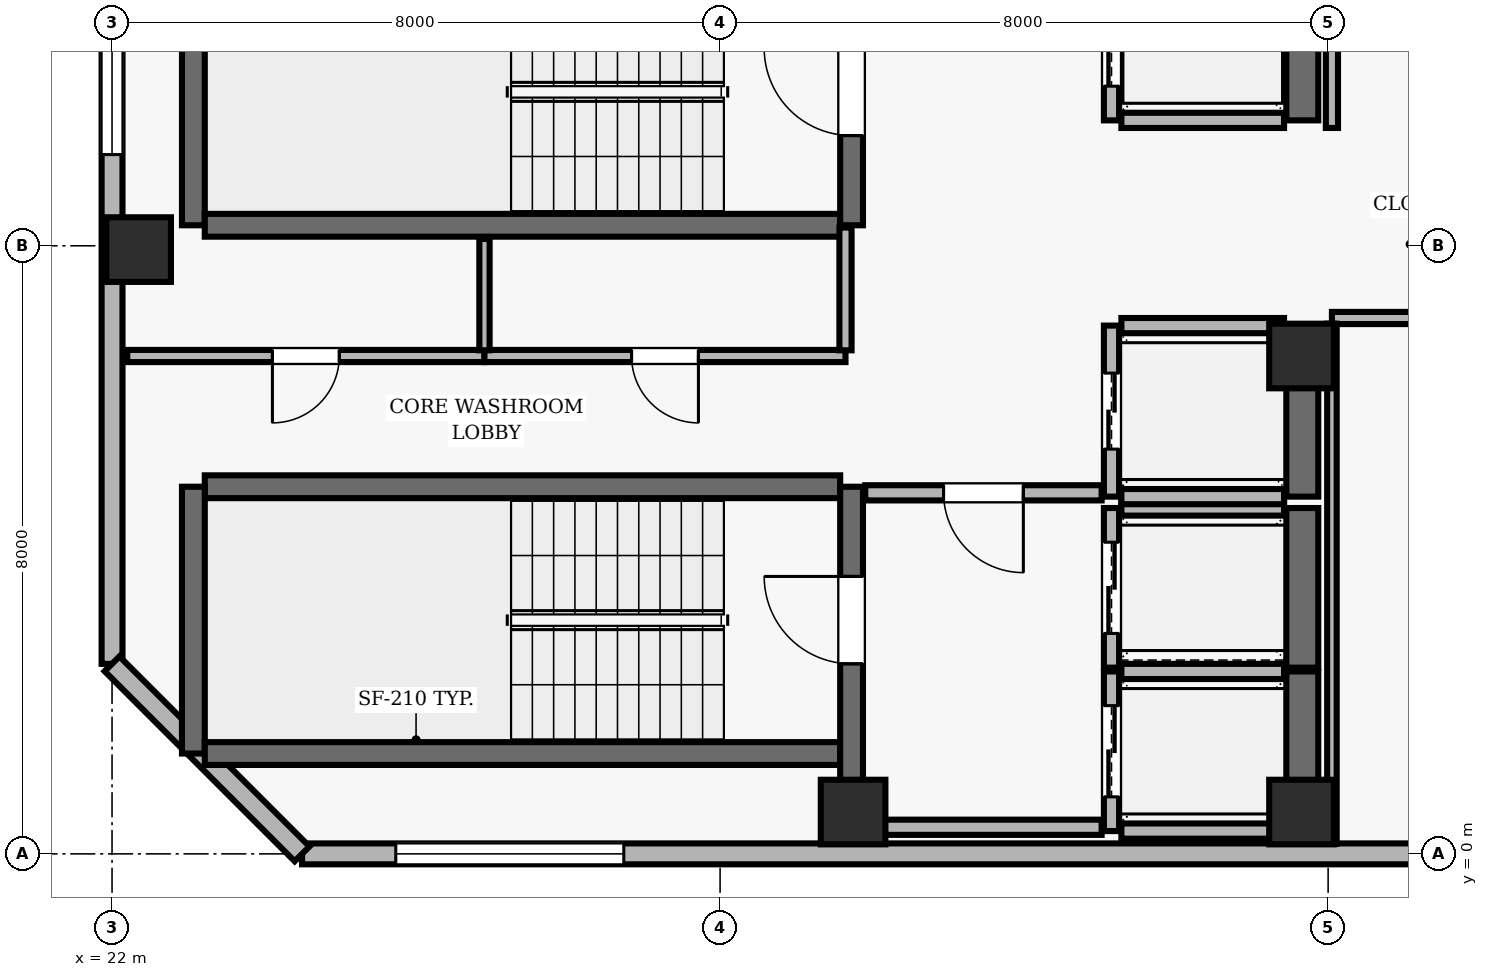
"""IFC4 building model, lengths in metres.
Left out: names, types, materials, properties, quantities, classifications, styles, units other than length and angle.
Written with IfcOpenShell. Run it as: python <this file> out.ifc"""

import sys

from ifc_helpers import new_model, si_unit, direction, frame, frame_2d, origin, origin_2d, place, context, subcontext, project, spatial, rectangle, extrude, element, fill, save


model = new_model("IFC4")
c1 = context("Model", 3, precision=1e-05, world=origin(), true_north=direction((0.0, 1.0)))
c2 = subcontext(c1, "Body", "Model", "MODEL_VIEW")
j1 = project(units=[si_unit("LENGTHUNIT", "METRE"), si_unit("PLANEANGLEUNIT", "RADIAN")], contexts=[c1])
p1 = place(None, origin())
s1 = spatial("IfcSite", under=j1, at=p1, CompositionType="ELEMENT")
p2 = place(p1, origin())
s2 = spatial("IfcBuilding", under=s1, at=p2, CompositionType="ELEMENT")
p3 = place(p2, frame((0.0, 0.0, 291.1)))
s3 = spatial("IfcBuildingStorey", under=s2, at=p3, CompositionType="ELEMENT", Elevation=291.1)
for number, where, z_axis, x_axis in (
    (1, (31.75, 0.55, 0.0), (0.0, 0.0, 1.0), (1.0, 0.0, 0.0)),
    (2, (37.65, 0.55, 0.0), (0.0, 0.0, 1.0), (1.0, 0.0, 0.0)),
    (3, (22.35, 7.95, 0.0), (0.0, 0.0, 1.0), (1.0, 0.0, 0.0)),
    (4, (37.65, 6.55, 0.0), (0.0, 0.0, 1.0), (1.0, 0.0, 0.0)),
):
    element("IfcColumn", number, at=place(p3, frame(where, z_axis=z_axis, x_axis=x_axis)), inside=s3, PredefinedType="COLUMN", context=c2, shape_type="SweptSolid", body=[
        extrude(rectangle(XDim=0.85, YDim=0.85, at=origin_2d()), origin(), (0.0, 0.0, 1.0), 3.9),
    ])
p4 = place(p3, frame((24.5, 0.0, 0.0), z_axis=(0.0, 0.0, 1.0), x_axis=(1.0, 0.0, 0.0)))
e5 = element("IfcWall", 5, at=p4, inside=s3, PredefinedType="SOLIDWALL", context=c2, shape_type="SweptSolid", body=[
    extrude(rectangle(XDim=32.8, YDim=0.275, at=frame_2d((16.4, 0.0))), origin(), (0.0, 0.0, 1.0), 3.69),
])
p5 = place(p4, frame((1.233, 0.0, 0.9)))
e6 = element("IfcOpeningElement", 6, at=p5, cuts=e5, PredefinedType="OPENING", context=c2, shape_type="SweptSolid", body=[
    extrude(rectangle(XDim=3.0, YDim=2.2, at=frame_2d((1.5, 1.1))), frame((0.0, 0.147, 0.0), z_axis=(0.0, -1.0, 0.0), x_axis=(1.0, 0.0, 0.0)), (0.0, 0.0, 1.0), 0.295),
])
p6 = place(p3, frame((22.0, 35.3, 0.0), z_axis=(0.0, 0.0, 1.0), x_axis=(0.0, -1.0, 0.0)))
e7 = element("IfcWall", 7, at=p6, inside=s3, PredefinedType="SOLIDWALL", context=c2, shape_type="SweptSolid", body=[
    extrude(rectangle(XDim=32.8, YDim=0.275, at=frame_2d((16.4, 0.0))), origin(), (0.0, 0.0, 1.0), 3.69),
])
p7 = place(p6, frame((7.3, 0.0, 0.0)))
e8 = element("IfcOpeningElement", 8, at=p7, cuts=e7, PredefinedType="OPENING", context=c2, shape_type="SweptSolid", body=[
    extrude(rectangle(XDim=1.0, YDim=2.2, at=frame_2d((0.5, 1.1))), frame((0.0, 0.147, 0.0), z_axis=(0.0, -1.0, 0.0), x_axis=(1.0, 0.0, 0.0)), (0.0, 0.0, 1.0), 0.295),
])
p8 = place(p6, frame((1.233, 0.0, 0.9)))
e9 = element("IfcOpeningElement", 9, at=p8, cuts=e7, PredefinedType="OPENING", context=c2, shape_type="SweptSolid", body=[
    extrude(rectangle(XDim=3.0, YDim=2.2, at=frame_2d((1.5, 1.1))), frame((0.0, 0.147, 0.0), z_axis=(0.0, -1.0, 0.0), x_axis=(1.0, 0.0, 0.0)), (0.0, 0.0, 1.0), 0.295),
])
p9 = place(p6, frame((12.617, 0.0, 0.9)))
e10 = element("IfcOpeningElement", 10, at=p9, cuts=e7, PredefinedType="OPENING", context=c2, shape_type="SweptSolid", body=[
    extrude(rectangle(XDim=3.0, YDim=2.2, at=frame_2d((1.5, 1.1))), frame((0.0, 0.147, 0.0), z_axis=(0.0, -1.0, 0.0), x_axis=(1.0, 0.0, 0.0)), (0.0, 0.0, 1.0), 0.295),
])
p10 = place(p6, frame((23.1, 0.0, 0.9)))
e11 = element("IfcOpeningElement", 11, at=p10, cuts=e7, PredefinedType="OPENING", context=c2, shape_type="SweptSolid", body=[
    extrude(rectangle(XDim=3.0, YDim=2.2, at=frame_2d((1.5, 1.1))), frame((0.0, 0.147, 0.0), z_axis=(0.0, -1.0, 0.0), x_axis=(1.0, 0.0, 0.0)), (0.0, 0.0, 1.0), 0.295),
])
p11 = place(p3, frame((22.0, 2.5, 0.0), z_axis=(0.0, 0.0, 1.0), x_axis=(0.707106781187, -0.707106781187, 0.0)))
e12 = element("IfcWall", 12, at=p11, inside=s3, PredefinedType="SOLIDWALL", context=c2, shape_type="SweptSolid", body=[
    extrude(rectangle(XDim=3.536, YDim=0.275, at=frame_2d((1.768, 0.0))), origin(), (0.0, 0.0, 1.0), 3.69),
])
p12 = place(p3, frame((31.58, 4.83, 0.0), z_axis=(0.0, 0.0, 1.0), x_axis=(-1.0, 0.0, 0.0)))
e13 = element("IfcWall", 13, at=p12, inside=s3, PredefinedType="SHEAR", context=c2, shape_type="SweptSolid", body=[
    extrude(rectangle(XDim=8.36, YDim=0.3, at=frame_2d((4.18, 0.0))), origin(), (0.0, 0.0, 1.0), 3.69),
])
p13 = place(p3, frame((23.07, 4.83, 0.0), z_axis=(0.0, 0.0, 1.0), x_axis=(0.0, -1.0, 0.0)))
e14 = element("IfcWall", 14, at=p13, inside=s3, PredefinedType="SHEAR", context=c2, shape_type="SweptSolid", body=[
    extrude(rectangle(XDim=3.51, YDim=0.3, at=frame_2d((1.755, 0.0))), origin(), (0.0, 0.0, 1.0), 3.69),
])
p14 = place(p3, frame((23.22, 1.32, 0.0), z_axis=(0.0, 0.0, 1.0), x_axis=(1.0, 0.0, 0.0)))
e15 = element("IfcWall", 15, at=p14, inside=s3, PredefinedType="SHEAR", context=c2, shape_type="SweptSolid", body=[
    extrude(rectangle(XDim=8.36, YDim=0.3, at=frame_2d((4.18, 0.0))), origin(), (0.0, 0.0, 1.0), 3.69),
])
p15 = place(p3, frame((31.73, 0.96, 0.0), z_axis=(0.0, 0.0, 1.0), x_axis=(0.0, 1.0, 0.0)))
e16 = element("IfcWall", 16, at=p15, inside=s3, PredefinedType="SHEAR", context=c2, shape_type="SweptSolid", body=[
    extrude(rectangle(XDim=3.87, YDim=0.3, at=frame_2d((1.935, 0.0))), origin(), (0.0, 0.0, 1.0), 3.69),
])
p16 = place(p15, frame((1.54, 0.0, 0.0)))
e17 = element("IfcOpeningElement", 17, at=p16, cuts=e16, PredefinedType="OPENING", context=c2, shape_type="SweptSolid", body=[
    extrude(rectangle(XDim=1.15, YDim=2.15, at=frame_2d((0.575, 1.075))), frame((0.0, 0.16, 0.0), z_axis=(0.0, -1.0, 0.0), x_axis=(1.0, 0.0, 0.0)), (0.0, 0.0, 1.0), 0.32),
])
p17 = place(p3, frame((23.07, 11.78, 0.0), z_axis=(0.0, 0.0, 1.0), x_axis=(0.0, -1.0, 0.0)))
e18 = element("IfcWall", 18, at=p17, inside=s3, PredefinedType="SHEAR", context=c2, shape_type="SweptSolid", body=[
    extrude(rectangle(XDim=3.51, YDim=0.3, at=frame_2d((1.755, 0.0))), origin(), (0.0, 0.0, 1.0), 3.69),
])
p18 = place(p3, frame((23.22, 8.27, 0.0), z_axis=(0.0, 0.0, 1.0), x_axis=(1.0, 0.0, 0.0)))
e19 = element("IfcWall", 19, at=p18, inside=s3, PredefinedType="SHEAR", context=c2, shape_type="SweptSolid", body=[
    extrude(rectangle(XDim=8.36, YDim=0.3, at=frame_2d((4.18, 0.0))), origin(), (0.0, 0.0, 1.0), 3.69),
])
p19 = place(p3, frame((31.73, 8.27, 0.0), z_axis=(0.0, 0.0, 1.0), x_axis=(0.0, 1.0, 0.0)))
e20 = element("IfcWall", 20, at=p19, inside=s3, PredefinedType="SHEAR", context=c2, shape_type="SweptSolid", body=[
    extrude(rectangle(XDim=3.51, YDim=0.3, at=frame_2d((1.755, 0.0))), origin(), (0.0, 0.0, 1.0), 3.69),
])
p20 = place(p19, frame((1.18, 0.0, 0.0)))
e21 = element("IfcOpeningElement", 21, at=p20, cuts=e20, PredefinedType="OPENING", context=c2, shape_type="SweptSolid", body=[
    extrude(rectangle(XDim=1.15, YDim=2.15, at=frame_2d((0.575, 1.075))), frame((0.0, 0.16, 0.0), z_axis=(0.0, -1.0, 0.0), x_axis=(1.0, 0.0, 0.0)), (0.0, 0.0, 1.0), 0.32),
])
p21 = place(p3, frame((35.15, 2.4, 0.0), z_axis=(0.0, 0.0, 1.0), x_axis=(0.0, -1.0, 0.0)))
e22 = element("IfcWall", 22, at=p21, inside=s3, PredefinedType="SOLIDWALL", context=c2, shape_type="SweptSolid", body=[
    extrude(rectangle(XDim=2.1, YDim=0.2, at=frame_2d((1.05, 0.0))), origin(), (0.0, 0.0, 1.0), 3.69),
])
p22 = place(p21, frame((0.45, 0.0, 0.0)))
e23 = element("IfcOpeningElement", 23, at=p22, cuts=e22, PredefinedType="OPENING", context=c2, shape_type="SweptSolid", body=[
    extrude(rectangle(XDim=1.2, YDim=2.15, at=frame_2d((0.6, 1.075))), frame((0.0, 0.11, 0.0), z_axis=(0.0, -1.0, 0.0), x_axis=(1.0, 0.0, 0.0)), (0.0, 0.0, 1.0), 0.22),
])
p23 = place(p3, frame((37.66, 0.3, 0.0), z_axis=(0.0, 0.0, 1.0), x_axis=(0.0, 1.0, 0.0)))
e24 = element("IfcWall", 24, at=p23, inside=s3, PredefinedType="SHEAR", context=c2, shape_type="SweptSolid", body=[
    extrude(rectangle(XDim=2.1, YDim=0.42, at=frame_2d((1.05, 0.0))), origin(), (0.0, 0.0, 1.0), 3.69),
])
for number, where, z_axis, x_axis in (
    (25, (35.28, 0.3, 0.0), (0.0, 0.0, 1.0), (1.0, 0.0, 0.0)),
    (26, (37.42, 2.4, 0.0), (0.0, 0.0, 1.0), (-1.0, 0.0, 0.0)),
):
    element("IfcWall", number, at=place(p3, frame(where, z_axis=z_axis, x_axis=x_axis)), inside=s3, PredefinedType="SOLIDWALL", context=c2, shape_type="SweptSolid", body=[
        extrude(rectangle(XDim=2.14, YDim=0.2, at=frame_2d((1.07, 0.0))), origin(), (0.0, 0.0, 1.0), 3.69),
    ])
p24 = place(p3, frame((35.15, 4.55, 0.0), z_axis=(0.0, 0.0, 1.0), x_axis=(0.0, -1.0, 0.0)))
e27 = element("IfcWall", 27, at=p24, inside=s3, PredefinedType="SOLIDWALL", context=c2, shape_type="SweptSolid", body=[
    extrude(rectangle(XDim=2.1, YDim=0.2, at=frame_2d((1.05, 0.0))), origin(), (0.0, 0.0, 1.0), 3.69),
])
p25 = place(p24, frame((0.45, 0.0, 0.0)))
e28 = element("IfcOpeningElement", 28, at=p25, cuts=e27, PredefinedType="OPENING", context=c2, shape_type="SweptSolid", body=[
    extrude(rectangle(XDim=1.2, YDim=2.15, at=frame_2d((0.6, 1.075))), frame((0.0, 0.11, 0.0), z_axis=(0.0, -1.0, 0.0), x_axis=(1.0, 0.0, 0.0)), (0.0, 0.0, 1.0), 0.22),
])
p26 = place(p3, frame((37.66, 2.45, 0.0), z_axis=(0.0, 0.0, 1.0), x_axis=(0.0, 1.0, 0.0)))
e29 = element("IfcWall", 29, at=p26, inside=s3, PredefinedType="SHEAR", context=c2, shape_type="SweptSolid", body=[
    extrude(rectangle(XDim=2.1, YDim=0.42, at=frame_2d((1.05, 0.0))), origin(), (0.0, 0.0, 1.0), 3.69),
])
p27 = place(p3, frame((37.42, 4.55, 0.0), z_axis=(0.0, 0.0, 1.0), x_axis=(-1.0, 0.0, 0.0)))
e30 = element("IfcWall", 30, at=p27, inside=s3, PredefinedType="SOLIDWALL", context=c2, shape_type="SweptSolid", body=[
    extrude(rectangle(XDim=2.14, YDim=0.2, at=frame_2d((1.07, 0.0))), origin(), (0.0, 0.0, 1.0), 3.69),
])
p28 = place(p3, frame((35.15, 6.95, 0.0), z_axis=(0.0, 0.0, 1.0), x_axis=(0.0, -1.0, 0.0)))
e31 = element("IfcWall", 31, at=p28, inside=s3, PredefinedType="SOLIDWALL", context=c2, shape_type="SweptSolid", body=[
    extrude(rectangle(XDim=2.25, YDim=0.2, at=frame_2d((1.125, 0.0))), origin(), (0.0, 0.0, 1.0), 3.69),
])
p29 = place(p28, frame((0.625, 0.0, 0.0)))
e32 = element("IfcOpeningElement", 32, at=p29, cuts=e31, PredefinedType="OPENING", context=c2, shape_type="SweptSolid", body=[
    extrude(rectangle(XDim=1.0, YDim=2.1, at=frame_2d((0.5, 1.05))), frame((0.0, 0.11, 0.0), z_axis=(0.0, -1.0, 0.0), x_axis=(1.0, 0.0, 0.0)), (0.0, 0.0, 1.0), 0.22),
])
p30 = place(p3, frame((37.66, 4.7, 0.0), z_axis=(0.0, 0.0, 1.0), x_axis=(0.0, 1.0, 0.0)))
e33 = element("IfcWall", 33, at=p30, inside=s3, PredefinedType="SHEAR", context=c2, shape_type="SweptSolid", body=[
    extrude(rectangle(XDim=2.25, YDim=0.42, at=frame_2d((1.125, 0.0))), origin(), (0.0, 0.0, 1.0), 3.69),
])
for number, where, z_axis, x_axis in (
    (34, (35.28, 4.7, 0.0), (0.0, 0.0, 1.0), (1.0, 0.0, 0.0)),
    (35, (37.42, 6.95, 0.0), (0.0, 0.0, 1.0), (-1.0, 0.0, 0.0)),
):
    element("IfcWall", number, at=place(p3, frame(where, z_axis=z_axis, x_axis=x_axis)), inside=s3, PredefinedType="SOLIDWALL", context=c2, shape_type="SweptSolid", body=[
        extrude(rectangle(XDim=2.14, YDim=0.2, at=frame_2d((1.07, 0.0))), origin(), (0.0, 0.0, 1.0), 3.69),
    ])
p31 = place(p3, frame((35.15, 11.55, 0.0), z_axis=(0.0, 0.0, 1.0), x_axis=(0.0, -1.0, 0.0)))
e36 = element("IfcWall", 36, at=p31, inside=s3, PredefinedType="SOLIDWALL", context=c2, shape_type="SweptSolid", body=[
    extrude(rectangle(XDim=1.9, YDim=0.2, at=frame_2d((0.95, 0.0))), origin(), (0.0, 0.0, 1.0), 3.69),
])
p32 = place(p31, frame((0.45, 0.0, 0.0)))
e37 = element("IfcOpeningElement", 37, at=p32, cuts=e36, PredefinedType="OPENING", context=c2, shape_type="SweptSolid", body=[
    extrude(rectangle(XDim=1.0, YDim=2.1, at=frame_2d((0.5, 1.05))), frame((0.0, 0.11, 0.0), z_axis=(0.0, -1.0, 0.0), x_axis=(1.0, 0.0, 0.0)), (0.0, 0.0, 1.0), 0.22),
])
p33 = place(p3, frame((37.66, 9.65, 0.0), z_axis=(0.0, 0.0, 1.0), x_axis=(0.0, 1.0, 0.0)))
e38 = element("IfcWall", 38, at=p33, inside=s3, PredefinedType="SHEAR", context=c2, shape_type="SweptSolid", body=[
    extrude(rectangle(XDim=1.9, YDim=0.42, at=frame_2d((0.95, 0.0))), origin(), (0.0, 0.0, 1.0), 3.69),
])
p34 = place(p3, frame((35.28, 9.65, 0.0), z_axis=(0.0, 0.0, 1.0), x_axis=(1.0, 0.0, 0.0)))
e39 = element("IfcWall", 39, at=p34, inside=s3, PredefinedType="SOLIDWALL", context=c2, shape_type="SweptSolid", body=[
    extrude(rectangle(XDim=2.14, YDim=0.2, at=frame_2d((1.07, 0.0))), origin(), (0.0, 0.0, 1.0), 3.69),
])
p35 = place(p3, frame((26.9, 6.55, 0.0), z_axis=(0.0, 0.0, 1.0), x_axis=(-1.0, 0.0, 0.0)))
e40 = element("IfcWall", 40, at=p35, inside=s3, PredefinedType="PARTITIONING", context=c2, shape_type="SweptSolid", body=[
    extrude(rectangle(XDim=4.7, YDim=0.16, at=frame_2d((2.35, 0.0))), origin(), (0.0, 0.0, 1.0), 3.69),
])
p36 = place(p35, frame((1.91, 0.0, 0.0)))
e41 = element("IfcOpeningElement", 41, at=p36, cuts=e40, PredefinedType="OPENING", context=c2, shape_type="SweptSolid", body=[
    extrude(rectangle(XDim=0.88, YDim=2.1, at=frame_2d((0.44, 1.05))), frame((0.0, 0.09, 0.0), z_axis=(0.0, -1.0, 0.0), x_axis=(1.0, 0.0, 0.0)), (0.0, 0.0, 1.0), 0.18),
])
p37 = place(p3, frame((31.65, 0.35, 0.0), z_axis=(0.0, 0.0, 1.0), x_axis=(1.0, 0.0, 0.0)))
e42 = element("IfcWall", 42, at=p37, inside=s3, PredefinedType="SOLIDWALL", context=c2, shape_type="SweptSolid", body=[
    extrude(rectangle(XDim=3.37, YDim=0.2, at=frame_2d((1.685, 0.0))), origin(), (0.0, 0.0, 1.0), 3.69),
])
p38 = place(p3, frame((31.65, 6.55, 0.0), z_axis=(0.0, 0.0, 1.0), x_axis=(-1.0, 0.0, 0.0)))
e43 = element("IfcWall", 43, at=p38, inside=s3, PredefinedType="PARTITIONING", context=c2, shape_type="SweptSolid", body=[
    extrude(rectangle(XDim=4.75, YDim=0.16, at=frame_2d((2.375, 0.0))), origin(), (0.0, 0.0, 1.0), 3.69),
])
p39 = place(p38, frame((1.935, 0.0, 0.0)))
e44 = element("IfcOpeningElement", 44, at=p39, cuts=e43, PredefinedType="OPENING", context=c2, shape_type="SweptSolid", body=[
    extrude(rectangle(XDim=0.88, YDim=2.1, at=frame_2d((0.44, 1.05))), frame((0.0, 0.09, 0.0), z_axis=(0.0, -1.0, 0.0), x_axis=(1.0, 0.0, 0.0)), (0.0, 0.0, 1.0), 0.18),
])
p40 = place(p3, frame((35.02, 4.75, 0.0), z_axis=(0.0, 0.0, 1.0), x_axis=(-1.0, 0.0, 0.0)))
e45 = element("IfcWall", 45, at=p40, inside=s3, PredefinedType="SOLIDWALL", context=c2, shape_type="SweptSolid", body=[
    extrude(rectangle(XDim=3.11, YDim=0.2, at=frame_2d((1.555, 0.0))), origin(), (0.0, 0.0, 1.0), 3.69),
])
p41 = place(p40, frame((1.03, 0.0, 0.0)))
e46 = element("IfcOpeningElement", 46, at=p41, cuts=e45, PredefinedType="OPENING", context=c2, shape_type="SweptSolid", body=[
    extrude(rectangle(XDim=1.05, YDim=2.15, at=frame_2d((0.525, 1.075))), frame((0.0, 0.11, 0.0), z_axis=(0.0, -1.0, 0.0), x_axis=(1.0, 0.0, 0.0)), (0.0, 0.0, 1.0), 0.22),
])
p42 = place(p3, frame((38.05, 7.05, 0.0), z_axis=(0.0, 0.0, 1.0), x_axis=(1.0, 0.0, 0.0)))
e47 = element("IfcWall", 47, at=p42, inside=s3, PredefinedType="PARTITIONING", context=c2, shape_type="SweptSolid", body=[
    extrude(rectangle(XDim=5.35, YDim=0.16, at=frame_2d((2.675, 0.0))), origin(), (0.0, 0.0, 1.0), 3.69),
])
p43 = place(p42, frame((2.225, 0.0, 0.0)))
e48 = element("IfcOpeningElement", 48, at=p43, cuts=e47, PredefinedType="OPENING", context=c2, shape_type="SweptSolid", body=[
    extrude(rectangle(XDim=0.9, YDim=2.1, at=frame_2d((0.45, 1.05))), frame((0.0, 0.09, 0.0), z_axis=(0.0, -1.0, 0.0), x_axis=(1.0, 0.0, 0.0)), (0.0, 0.0, 1.0), 0.18),
])
p44 = place(p3, frame((26.9, 6.625, 0.0), z_axis=(0.0, 0.0, 1.0), x_axis=(0.0, 1.0, 0.0)))
e49 = element("IfcWall", 49, at=p44, inside=s3, PredefinedType="PARTITIONING", context=c2, shape_type="SweptSolid", body=[
    extrude(rectangle(XDim=1.465, YDim=0.135, at=frame_2d((0.732, 0.0))), origin(), (0.0, 0.0, 1.0), 3.69),
])
p45 = place(p3, frame((31.65, 8.24, 0.0), z_axis=(0.0, 0.0, 1.0), x_axis=(0.0, -1.0, 0.0)))
e50 = element("IfcWall", 50, at=p45, inside=s3, PredefinedType="PARTITIONING", context=c2, shape_type="SweptSolid", body=[
    extrude(rectangle(XDim=1.615, YDim=0.16, at=frame_2d((0.808, 0.0))), origin(), (0.0, 0.0, 1.0), 3.69),
])
p46 = place(p3, frame((38.05, 6.975, 0.0), z_axis=(0.0, 0.0, 1.0), x_axis=(0.0, -1.0, 0.0)))
e51 = element("IfcWall", 51, at=p46, inside=s3, PredefinedType="PARTITIONING", context=c2, shape_type="SweptSolid", body=[
    extrude(rectangle(XDim=6.842, YDim=0.125, at=frame_2d((3.421, 0.0))), origin(), (0.0, 0.0, 1.0), 3.227),
])
p47 = place(p3, frame((38.05, 15.925, 0.0), z_axis=(0.0, 0.0, 1.0), x_axis=(0.0, -1.0, 0.0)))
e52 = element("IfcWall", 52, at=p47, inside=s3, PredefinedType="PARTITIONING", context=c2, shape_type="SweptSolid", body=[
    extrude(rectangle(XDim=6.375, YDim=0.16, at=frame_2d((3.188, 0.0))), origin(), (0.0, 0.0, 1.0), 3.227),
])
p48 = place(p5, origin())
e53 = element("IfcWindow", 53, at=p48, inside=s3, PartitioningType="SINGLE_PANEL", PredefinedType="WINDOW", context=c2, shape_type="SweptSolid", body=[
    extrude(rectangle(XDim=3.0, YDim=2.2, at=frame_2d((1.5, 1.1))), frame((0.0, 0.03, 0.0), z_axis=(0.0, -1.0, 0.0), x_axis=(1.0, 0.0, 0.0)), (0.0, 0.0, 1.0), 0.06),
])
fill(e6, e53)
p49 = place(p10, origin())
e54 = element("IfcWindow", 54, at=p49, inside=s3, PartitioningType="SINGLE_PANEL", PredefinedType="WINDOW", context=c2, shape_type="SweptSolid", body=[
    extrude(rectangle(XDim=3.0, YDim=2.2, at=frame_2d((1.5, 1.1))), frame((0.0, 0.03, 0.0), z_axis=(0.0, -1.0, 0.0), x_axis=(1.0, 0.0, 0.0)), (0.0, 0.0, 1.0), 0.06),
])
fill(e11, e54)
p50 = place(p16, origin())
e55 = element("IfcDoor", 55, at=p50, inside=s3, OperationType="SINGLE_SWING_RIGHT", PredefinedType="DOOR", context=c2, shape_type="SweptSolid", body=[
    extrude(rectangle(XDim=1.15, YDim=2.15, at=frame_2d((0.575, 1.075))), frame((0.0, 0.025, 0.0), z_axis=(0.0, -1.0, 0.0), x_axis=(1.0, 0.0, 0.0)), (0.0, 0.0, 1.0), 0.05),
])
fill(e17, e55)
p51 = place(p20, origin())
e56 = element("IfcDoor", 56, at=p51, inside=s3, OperationType="SINGLE_SWING_RIGHT", PredefinedType="DOOR", context=c2, shape_type="SweptSolid", body=[
    extrude(rectangle(XDim=1.15, YDim=2.15, at=frame_2d((0.575, 1.075))), frame((0.0, 0.025, 0.0), z_axis=(0.0, -1.0, 0.0), x_axis=(1.0, 0.0, 0.0)), (0.0, 0.0, 1.0), 0.05),
])
fill(e21, e56)
p52 = place(p22, origin())
e57 = element("IfcDoor", 57, at=p52, inside=s3, OperationType="DOUBLE_DOOR_SLIDING", PredefinedType="DOOR", context=c2, shape_type="SweptSolid", body=[
    extrude(rectangle(XDim=1.2, YDim=2.15, at=frame_2d((0.6, 1.075))), frame((0.0, 0.025, 0.0), z_axis=(0.0, -1.0, 0.0), x_axis=(1.0, 0.0, 0.0)), (0.0, 0.0, 1.0), 0.05),
])
fill(e23, e57)
p53 = place(p25, origin())
e58 = element("IfcDoor", 58, at=p53, inside=s3, OperationType="DOUBLE_DOOR_SLIDING", PredefinedType="DOOR", context=c2, shape_type="SweptSolid", body=[
    extrude(rectangle(XDim=1.2, YDim=2.15, at=frame_2d((0.6, 1.075))), frame((0.0, 0.025, 0.0), z_axis=(0.0, -1.0, 0.0), x_axis=(1.0, 0.0, 0.0)), (0.0, 0.0, 1.0), 0.05),
])
fill(e28, e58)
p54 = place(p29, origin())
e59 = element("IfcDoor", 59, at=p54, inside=s3, OperationType="DOUBLE_DOOR_SLIDING", PredefinedType="DOOR", context=c2, shape_type="SweptSolid", body=[
    extrude(rectangle(XDim=1.0, YDim=2.1, at=frame_2d((0.5, 1.05))), frame((0.0, 0.025, 0.0), z_axis=(0.0, -1.0, 0.0), x_axis=(1.0, 0.0, 0.0)), (0.0, 0.0, 1.0), 0.05),
])
fill(e32, e59)
p55 = place(p32, origin())
e60 = element("IfcDoor", 60, at=p55, inside=s3, OperationType="DOUBLE_DOOR_SLIDING", PredefinedType="DOOR", context=c2, shape_type="SweptSolid", body=[
    extrude(rectangle(XDim=1.0, YDim=2.1, at=frame_2d((0.5, 1.05))), frame((0.0, 0.025, 0.0), z_axis=(0.0, -1.0, 0.0), x_axis=(1.0, 0.0, 0.0)), (0.0, 0.0, 1.0), 0.05),
])
fill(e37, e60)
p56 = place(p41, origin())
e61 = element("IfcDoor", 61, at=p56, inside=s3, OperationType="SINGLE_SWING_LEFT", PredefinedType="DOOR", context=c2, shape_type="SweptSolid", body=[
    extrude(rectangle(XDim=1.05, YDim=2.15, at=frame_2d((0.525, 1.075))), frame((0.0, 0.025, 0.0), z_axis=(0.0, -1.0, 0.0), x_axis=(1.0, 0.0, 0.0)), (0.0, 0.0, 1.0), 0.05),
])
fill(e46, e61)
p57 = place(p36, origin())
e62 = element("IfcDoor", 62, at=p57, inside=s3, OperationType="SINGLE_SWING_RIGHT", PredefinedType="DOOR", context=c2, shape_type="SweptSolid", body=[
    extrude(rectangle(XDim=0.88, YDim=2.1, at=frame_2d((0.44, 1.05))), frame((0.0, 0.025, 0.0), z_axis=(0.0, -1.0, 0.0), x_axis=(1.0, 0.0, 0.0)), (0.0, 0.0, 1.0), 0.05),
])
fill(e41, e62)
p58 = place(p39, origin())
e63 = element("IfcDoor", 63, at=p58, inside=s3, OperationType="SINGLE_SWING_LEFT", PredefinedType="DOOR", context=c2, shape_type="SweptSolid", body=[
    extrude(rectangle(XDim=0.88, YDim=2.1, at=frame_2d((0.44, 1.05))), frame((0.0, 0.025, 0.0), z_axis=(0.0, -1.0, 0.0), x_axis=(1.0, 0.0, 0.0)), (0.0, 0.0, 1.0), 0.05),
])
fill(e44, e63)
save(model, sys.argv[1])
